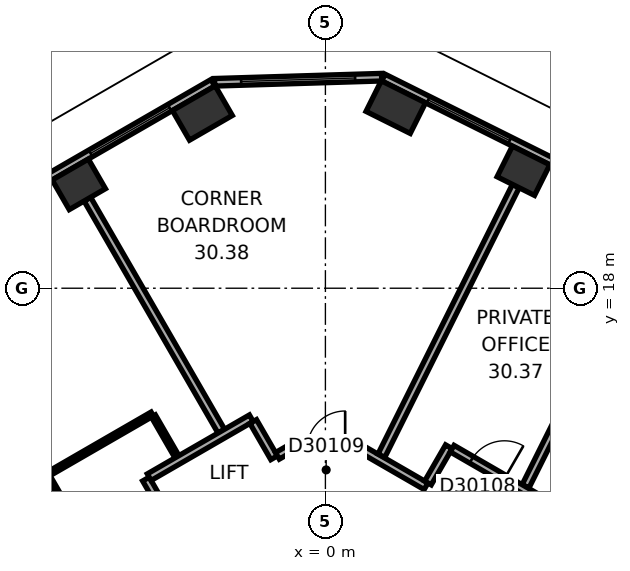
"""IFC4 building model, lengths in metres.
Left out: names, types, materials, properties, quantities, classifications, styles, units other than length and angle.
Written with IfcOpenShell. Run it as: python <this file> out.ifc"""

import sys

from ifc_helpers import new_model, si_unit, direction, frame, frame_2d, origin, origin_2d, place, context, subcontext, project, spatial, rectangle, extrude, element, fill, save


model = new_model("IFC4")
c1 = context("Model", 3, precision=1e-05, world=origin(), true_north=direction((0.0, 1.0)))
c2 = subcontext(c1, "Body", "Model", "MODEL_VIEW")
j1 = project(units=[si_unit("LENGTHUNIT", "METRE"), si_unit("PLANEANGLEUNIT", "RADIAN")], contexts=[c1])
p1 = place(None, origin())
s1 = spatial("IfcSite", under=j1, at=p1, CompositionType="ELEMENT")
p2 = place(p1, origin())
s2 = spatial("IfcBuilding", under=s1, at=p2, CompositionType="ELEMENT")
p3 = place(p2, frame((0.0, 0.0, 124.4)))
s3 = spatial("IfcBuildingStorey", under=s2, at=p3, CompositionType="ELEMENT", Elevation=124.4)
p4 = place(p3, frame((5.211, 21.091, 0.0), z_axis=(0.0, 0.0, 1.0), x_axis=(-0.894934361602, 0.44619781311, 0.0)))
e1 = element("IfcColumn", 1, at=p4, inside=s3, PredefinedType="COLUMN", context=c2, shape_type="SweptSolid", body=[
    extrude(rectangle(XDim=1.1, YDim=0.9, at=origin_2d()), origin(), (0.0, 0.0, 1.0), 3.7),
])
for number, where, z_axis, x_axis in (
    (2, (1.852, 22.766, 0.0), (0.0, 0.0, 1.0), (-0.895, 0.446, 0.0)),
    (3, (-3.238, 22.61, 0.0), (0.0, 0.0, 1.0), (-0.866, -0.5, 0.0)),
):
    element("IfcColumn", number, at=place(p3, frame(where, z_axis=z_axis, x_axis=x_axis)), inside=s3, PredefinedType="COLUMN", context=c2, shape_type="SweptSolid", body=[
        extrude(rectangle(XDim=1.3, YDim=0.9, at=origin_2d()), origin(), (0.0, 0.0, 1.0), 3.7),
    ])
p5 = place(p3, frame((-6.489, 20.733, 0.0), z_axis=(0.0, 0.0, 1.0), x_axis=(-0.866025403784, -0.5, 0.0)))
e4 = element("IfcColumn", 4, at=p5, inside=s3, PredefinedType="COLUMN", context=c2, shape_type="SweptSolid", body=[
    extrude(rectangle(XDim=1.1, YDim=0.9, at=origin_2d()), origin(), (0.0, 0.0, 1.0), 3.7),
])
p6 = place(p3, frame((19.464, 14.599, 0.0), z_axis=(0.0, 0.0, 1.0), x_axis=(-0.894935755043, 0.446195018289, 0.0)))
e5 = element("IfcWall", 5, at=p6, inside=s3, PredefinedType="STANDARD", context=c2, shape_type="SweptSolid", body=[
    extrude(rectangle(XDim=20.044, YDim=0.2, at=frame_2d((10.022, 0.0))), origin(), (0.0, 0.0, 1.0), 3.7),
])
p7 = place(p6, frame((1.313, 0.0, 0.9)))
e6 = element("IfcOpeningElement", 6, at=p7, cuts=e5, PredefinedType="OPENING", context=c2, shape_type="SweptSolid", body=[
    extrude(rectangle(XDim=2.4, YDim=2.0, at=frame_2d((1.2, 1.0))), frame((0.0, 0.11, 0.0), z_axis=(0.0, -1.0, 0.0), x_axis=(1.0, 0.0, 0.0)), (0.0, 0.0, 1.0), 0.22),
])
p8 = place(p6, frame((5.067, 0.0, 0.9)))
e7 = element("IfcOpeningElement", 7, at=p8, cuts=e5, PredefinedType="OPENING", context=c2, shape_type="SweptSolid", body=[
    extrude(rectangle(XDim=2.4, YDim=2.0, at=frame_2d((1.2, 1.0))), frame((0.0, 0.11, 0.0), z_axis=(0.0, -1.0, 0.0), x_axis=(1.0, 0.0, 0.0)), (0.0, 0.0, 1.0), 0.22),
])
p9 = place(p6, frame((8.821, 0.0, 0.9)))
e8 = element("IfcOpeningElement", 8, at=p9, cuts=e5, PredefinedType="OPENING", context=c2, shape_type="SweptSolid", body=[
    extrude(rectangle(XDim=2.4, YDim=2.0, at=frame_2d((1.2, 1.0))), frame((0.0, 0.11, 0.0), z_axis=(0.0, -1.0, 0.0), x_axis=(1.0, 0.0, 0.0)), (0.0, 0.0, 1.0), 0.22),
])
p10 = place(p6, frame((12.575, 0.0, 0.9)))
e9 = element("IfcOpeningElement", 9, at=p10, cuts=e5, PredefinedType="OPENING", context=c2, shape_type="SweptSolid", body=[
    extrude(rectangle(XDim=2.4, YDim=2.0, at=frame_2d((1.2, 1.0))), frame((0.0, 0.11, 0.0), z_axis=(0.0, -1.0, 0.0), x_axis=(1.0, 0.0, 0.0)), (0.0, 0.0, 1.0), 0.22),
])
p11 = place(p6, frame((16.329, 0.0, 0.9)))
e10 = element("IfcOpeningElement", 10, at=p11, cuts=e5, PredefinedType="OPENING", context=c2, shape_type="SweptSolid", body=[
    extrude(rectangle(XDim=2.4, YDim=2.0, at=frame_2d((1.2, 1.0))), frame((0.0, 0.11, 0.0), z_axis=(0.0, -1.0, 0.0), x_axis=(1.0, 0.0, 0.0)), (0.0, 0.0, 1.0), 0.22),
])
p12 = place(p3, frame((1.479, 23.553, 0.0), z_axis=(0.0, 0.0, 1.0), x_axis=(-0.999534786117, -0.03049936625, 0.0)))
e11 = element("IfcWall", 11, at=p12, inside=s3, PredefinedType="STANDARD", context=c2, shape_type="SweptSolid", body=[
    extrude(rectangle(XDim=4.395, YDim=0.2, at=frame_2d((2.197, 0.0))), origin(), (0.0, 0.0, 1.0), 3.7),
])
p13 = place(p12, frame((0.698, 0.0, 0.9)))
e12 = element("IfcOpeningElement", 12, at=p13, cuts=e11, PredefinedType="OPENING", context=c2, shape_type="SweptSolid", body=[
    extrude(rectangle(XDim=3.0, YDim=2.0, at=frame_2d((1.5, 1.0))), frame((0.0, 0.11, 0.0), z_axis=(0.0, -1.0, 0.0), x_axis=(1.0, 0.0, 0.0)), (0.0, 0.0, 1.0), 0.22),
])
p14 = place(p3, frame((-2.961, 23.405, 0.0), z_axis=(0.0, 0.0, 1.0), x_axis=(-0.866023315909, -0.500003616288, 0.0)))
e13 = element("IfcWall", 13, at=p14, inside=s3, PredefinedType="STANDARD", context=c2, shape_type="SweptSolid", body=[
    extrude(rectangle(XDim=20.044, YDim=0.2, at=frame_2d((10.022, 0.0))), origin(), (0.0, 0.0, 1.0), 3.7),
])
p15 = place(p14, frame((1.314, 0.0, 0.9)))
e14 = element("IfcOpeningElement", 14, at=p15, cuts=e13, PredefinedType="OPENING", context=c2, shape_type="SweptSolid", body=[
    extrude(rectangle(XDim=2.4, YDim=2.0, at=frame_2d((1.2, 1.0))), frame((0.0, 0.11, 0.0), z_axis=(0.0, -1.0, 0.0), x_axis=(1.0, 0.0, 0.0)), (0.0, 0.0, 1.0), 0.22),
])
p16 = place(p14, frame((5.069, 0.0, 0.9)))
e15 = element("IfcOpeningElement", 15, at=p16, cuts=e13, PredefinedType="OPENING", context=c2, shape_type="SweptSolid", body=[
    extrude(rectangle(XDim=2.4, YDim=2.0, at=frame_2d((1.2, 1.0))), frame((0.0, 0.11, 0.0), z_axis=(0.0, -1.0, 0.0), x_axis=(1.0, 0.0, 0.0)), (0.0, 0.0, 1.0), 0.22),
])
p17 = place(p14, frame((8.823, 0.0, 0.9)))
e16 = element("IfcOpeningElement", 16, at=p17, cuts=e13, PredefinedType="OPENING", context=c2, shape_type="SweptSolid", body=[
    extrude(rectangle(XDim=2.4, YDim=2.0, at=frame_2d((1.2, 1.0))), frame((0.0, 0.11, 0.0), z_axis=(0.0, -1.0, 0.0), x_axis=(1.0, 0.0, 0.0)), (0.0, 0.0, 1.0), 0.22),
])
p18 = place(p14, frame((12.577, 0.0, 0.9)))
e17 = element("IfcOpeningElement", 17, at=p18, cuts=e13, PredefinedType="OPENING", context=c2, shape_type="SweptSolid", body=[
    extrude(rectangle(XDim=2.4, YDim=2.0, at=frame_2d((1.2, 1.0))), frame((0.0, 0.11, 0.0), z_axis=(0.0, -1.0, 0.0), x_axis=(1.0, 0.0, 0.0)), (0.0, 0.0, 1.0), 0.22),
])
p19 = place(p14, frame((16.331, 0.0, 0.9)))
e18 = element("IfcOpeningElement", 18, at=p19, cuts=e13, PredefinedType="OPENING", context=c2, shape_type="SweptSolid", body=[
    extrude(rectangle(XDim=2.4, YDim=2.0, at=frame_2d((1.2, 1.0))), frame((0.0, 0.11, 0.0), z_axis=(0.0, -1.0, 0.0), x_axis=(1.0, 0.0, 0.0)), (0.0, 0.0, 1.0), 0.22),
])
p20 = place(p3, frame((-7.328, 13.09, 0.0), z_axis=(0.0, 0.0, 1.0), x_axis=(0.866008981251, 0.500028443584, 0.0)))
e19 = element("IfcWall", 19, at=p20, inside=s3, PredefinedType="PARTITIONING", context=c2, shape_type="SweptSolid", body=[
    extrude(rectangle(XDim=3.2, YDim=0.12, at=frame_2d((1.6, 0.0))), origin(), (0.0, 0.0, 1.0), 3.42),
])
p21 = place(p3, frame((-6.264, 20.344, 0.0), z_axis=(0.0, 0.0, 1.0), x_axis=(0.500009260695, -0.866020057054, 0.0)))
e20 = element("IfcWall", 20, at=p21, inside=s3, PredefinedType="PARTITIONING", context=c2, shape_type="SweptSolid", body=[
    extrude(rectangle(XDim=7.049, YDim=0.2, at=frame_2d((3.524, 0.0))), origin(), (0.0, 0.0, 1.0), 3.42),
])
p22 = place(p3, frame((-6.078, 10.925, 0.0), z_axis=(0.0, 0.0, 1.0), x_axis=(-0.500002508028, 0.866023955769, 0.0)))
e21 = element("IfcWall", 21, at=p22, inside=s3, PredefinedType="PARTITIONING", context=c2, shape_type="SweptSolid", body=[
    extrude(rectangle(XDim=2.44, YDim=0.12, at=frame_2d((1.22, 0.0))), origin(), (0.0, 0.0, 1.0), 2.87),
])
p23 = place(p22, frame((0.77, 0.0, 0.0)))
e22 = element("IfcOpeningElement", 22, at=p23, cuts=e21, PredefinedType="OPENING", context=c2, shape_type="SweptSolid", body=[
    extrude(rectangle(XDim=0.9, YDim=2.1, at=frame_2d((0.45, 1.05))), frame((0.0, 0.07, 0.0), z_axis=(0.0, -1.0, 0.0), x_axis=(1.0, 0.0, 0.0)), (0.0, 0.0, 1.0), 0.14),
])
p24 = place(p3, frame((-4.723, 12.978, 0.0), z_axis=(0.0, 0.0, 1.0), x_axis=(0.500074377092, -0.865982457891, 0.0)))
e23 = element("IfcWall", 23, at=p24, inside=s3, PredefinedType="PARTITIONING", context=c2, shape_type="SweptSolid", body=[
    extrude(rectangle(XDim=1.201, YDim=0.2, at=frame_2d((0.601, 0.0))), origin(), (0.0, 0.0, 1.0), 3.42),
])
p25 = place(p3, frame((-4.526, 14.638, 0.0), z_axis=(0.0, 0.0, 1.0), x_axis=(0.499932836684, -0.86606417707, 0.0)))
e24 = element("IfcWall", 24, at=p25, inside=s3, PredefinedType="PARTITIONING", context=c2, shape_type="SweptSolid", body=[
    extrude(rectangle(XDim=1.239, YDim=0.12, at=frame_2d((0.62, 0.0))), origin(), (0.0, 0.0, 1.0), 3.42),
])
p26 = place(p3, frame((-1.95, 14.579, 0.0), z_axis=(0.0, 0.0, 1.0), x_axis=(-0.866011260204, -0.500024496599, 0.0)))
e25 = element("IfcWall", 25, at=p26, inside=s3, PredefinedType="PARTITIONING", context=c2, shape_type="SweptSolid", body=[
    extrude(rectangle(XDim=3.102, YDim=0.2, at=frame_2d((1.551, 0.0))), origin(), (0.0, 0.0, 1.0), 3.42),
])
p27 = place(p3, frame((-1.349, 13.539, 0.0), z_axis=(0.0, 0.0, 1.0), x_axis=(-0.500074377092, 0.865982457891, 0.0)))
e26 = element("IfcWall", 26, at=p27, inside=s3, PredefinedType="PARTITIONING", context=c2, shape_type="SweptSolid", body=[
    extrude(rectangle(XDim=1.101, YDim=0.2, at=frame_2d((0.55, 0.0))), origin(), (0.0, 0.0, 1.0), 3.42),
])
p28 = place(p3, frame((-0.95, 13.77, 0.0), z_axis=(0.0, 0.0, 1.0), x_axis=(-0.865904111586, -0.500210025428, 0.0)))
e27 = element("IfcWall", 27, at=p28, inside=s3, PredefinedType="PARTITIONING", context=c2, shape_type="SweptSolid", body=[
    extrude(rectangle(XDim=0.361, YDim=0.2, at=frame_2d((0.181, 0.0))), origin(), (0.0, 0.0, 1.0), 3.42),
])
p29 = place(p3, frame((0.95, 13.77, 0.0), z_axis=(0.0, 0.0, 1.0), x_axis=(-1.0, 0.0, 0.0)))
e28 = element("IfcWall", 28, at=p29, inside=s3, PredefinedType="PARTITIONING", context=c2, shape_type="SweptSolid", body=[
    extrude(rectangle(XDim=1.86, YDim=0.2, at=frame_2d((0.93, 0.0))), origin(), (0.0, 0.0, 1.0), 3.42),
])
p30 = place(p29, frame((0.43, 0.0, 0.0)))
e29 = element("IfcOpeningElement", 29, at=p30, cuts=e28, PredefinedType="OPENING", context=c2, shape_type="SweptSolid", body=[
    extrude(rectangle(XDim=1.0, YDim=2.1, at=frame_2d((0.5, 1.05))), frame((0.0, 0.11, 0.0), z_axis=(0.0, -1.0, 0.0), x_axis=(1.0, 0.0, 0.0)), (0.0, 0.0, 1.0), 0.22),
])
p31 = place(p3, frame((2.648, 12.789, 0.0), z_axis=(0.0, 0.0, 1.0), x_axis=(-0.8660607342, 0.499938800931, 0.0)))
e30 = element("IfcWall", 30, at=p31, inside=s3, PredefinedType="PARTITIONING", context=c2, shape_type="SweptSolid", body=[
    extrude(rectangle(XDim=1.921, YDim=0.2, at=frame_2d((0.96, 0.0))), origin(), (0.0, 0.0, 1.0), 3.42),
])
p32 = place(p3, frame((3.249, 13.829, 0.0), z_axis=(0.0, 0.0, 1.0), x_axis=(-0.499812034598, -0.866133898465, 0.0)))
e31 = element("IfcWall", 31, at=p32, inside=s3, PredefinedType="PARTITIONING", context=c2, shape_type="SweptSolid", body=[
    extrude(rectangle(XDim=1.101, YDim=0.2, at=frame_2d((0.551, 0.0))), origin(), (0.0, 0.0, 1.0), 3.42),
])
p33 = place(p3, frame((5.01, 20.688, 0.0), z_axis=(0.0, 0.0, 1.0), x_axis=(-0.446203062394, -0.894931744386, 0.0)))
e32 = element("IfcWall", 32, at=p33, inside=s3, PredefinedType="PARTITIONING", context=c2, shape_type="SweptSolid", body=[
    extrude(rectangle(XDim=7.927, YDim=0.2, at=frame_2d((3.963, 0.0))), origin(), (0.0, 0.0, 1.0), 2.87),
])
p34 = place(p3, frame((8.37, 19.013, 0.0), z_axis=(0.0, 0.0, 1.0), x_axis=(-0.446187985757, -0.894939261272, 0.0)))
e33 = element("IfcWall", 33, at=p34, inside=s3, PredefinedType="PARTITIONING", context=c2, shape_type="SweptSolid", body=[
    extrude(rectangle(XDim=6.953, YDim=0.2, at=frame_2d((3.477, 0.0))), origin(), (0.0, 0.0, 1.0), 3.42),
])
p35 = place(p3, frame((11.646, 8.981, 0.0), z_axis=(0.0, 0.0, 1.0), x_axis=(-0.866027142779, 0.499996987961, 0.0)))
e34 = element("IfcWall", 34, at=p35, inside=s3, PredefinedType="PARTITIONING", context=c2, shape_type="SweptSolid", body=[
    extrude(rectangle(XDim=9.597, YDim=0.2, at=frame_2d((4.798, 0.0))), origin(), (0.0, 0.0, 1.0), 3.42),
])
p36 = place(p35, frame((2.086, 0.0, 0.0)))
e35 = element("IfcOpeningElement", 35, at=p36, cuts=e34, PredefinedType="OPENING", context=c2, shape_type="SweptSolid", body=[
    extrude(rectangle(XDim=1.0, YDim=2.1, at=frame_2d((0.5, 1.05))), frame((0.0, 0.11, 0.0), z_axis=(0.0, -1.0, 0.0), x_axis=(1.0, 0.0, 0.0)), (0.0, 0.0, 1.0), 0.22),
])
p37 = place(p35, frame((8.01, 0.0, 0.0)))
e36 = element("IfcOpeningElement", 36, at=p37, cuts=e34, PredefinedType="OPENING", context=c2, shape_type="SweptSolid", body=[
    extrude(rectangle(XDim=1.0, YDim=2.1, at=frame_2d((0.5, 1.05))), frame((0.0, 0.11, 0.0), z_axis=(0.0, -1.0, 0.0), x_axis=(1.0, 0.0, 0.0)), (0.0, 0.0, 1.0), 0.22),
])
p38 = place(p11, origin())
e37 = element("IfcWindow", 37, at=p38, inside=s3, PartitioningType="SINGLE_PANEL", PredefinedType="WINDOW", context=c2, shape_type="SweptSolid", body=[
    extrude(rectangle(XDim=2.4, YDim=2.0, at=frame_2d((1.2, 1.0))), frame((0.0, 0.03, 0.0), z_axis=(0.0, -1.0, 0.0), x_axis=(1.0, 0.0, 0.0)), (0.0, 0.0, 1.0), 0.06),
])
fill(e10, e37)
p39 = place(p13, origin())
e38 = element("IfcWindow", 38, at=p39, inside=s3, PartitioningType="SINGLE_PANEL", PredefinedType="WINDOW", context=c2, shape_type="SweptSolid", body=[
    extrude(rectangle(XDim=3.0, YDim=2.0, at=frame_2d((1.5, 1.0))), frame((0.0, 0.03, 0.0), z_axis=(0.0, -1.0, 0.0), x_axis=(1.0, 0.0, 0.0)), (0.0, 0.0, 1.0), 0.06),
])
fill(e12, e38)
p40 = place(p15, origin())
e39 = element("IfcWindow", 39, at=p40, inside=s3, PartitioningType="SINGLE_PANEL", PredefinedType="WINDOW", context=c2, shape_type="SweptSolid", body=[
    extrude(rectangle(XDim=2.4, YDim=2.0, at=frame_2d((1.2, 1.0))), frame((0.0, 0.03, 0.0), z_axis=(0.0, -1.0, 0.0), x_axis=(1.0, 0.0, 0.0)), (0.0, 0.0, 1.0), 0.06),
])
fill(e14, e39)
p41 = place(p37, origin())
e40 = element("IfcDoor", 40, at=p41, inside=s3, OperationType="SINGLE_SWING_LEFT", PredefinedType="DOOR", context=c2, shape_type="SweptSolid", body=[
    extrude(rectangle(XDim=1.0, YDim=2.1, at=frame_2d((0.5, 1.05))), frame((0.0, 0.025, 0.0), z_axis=(0.0, -1.0, 0.0), x_axis=(1.0, 0.0, 0.0)), (0.0, 0.0, 1.0), 0.05),
])
fill(e36, e40)
p42 = place(p30, origin())
e41 = element("IfcDoor", 41, at=p42, inside=s3, OperationType="SINGLE_SWING_LEFT", PredefinedType="DOOR", context=c2, shape_type="SweptSolid", body=[
    extrude(rectangle(XDim=1.0, YDim=2.1, at=frame_2d((0.5, 1.05))), frame((0.0, 0.025, 0.0), z_axis=(0.0, -1.0, 0.0), x_axis=(1.0, 0.0, 0.0)), (0.0, 0.0, 1.0), 0.05),
])
fill(e29, e41)
save(model, sys.argv[1])
